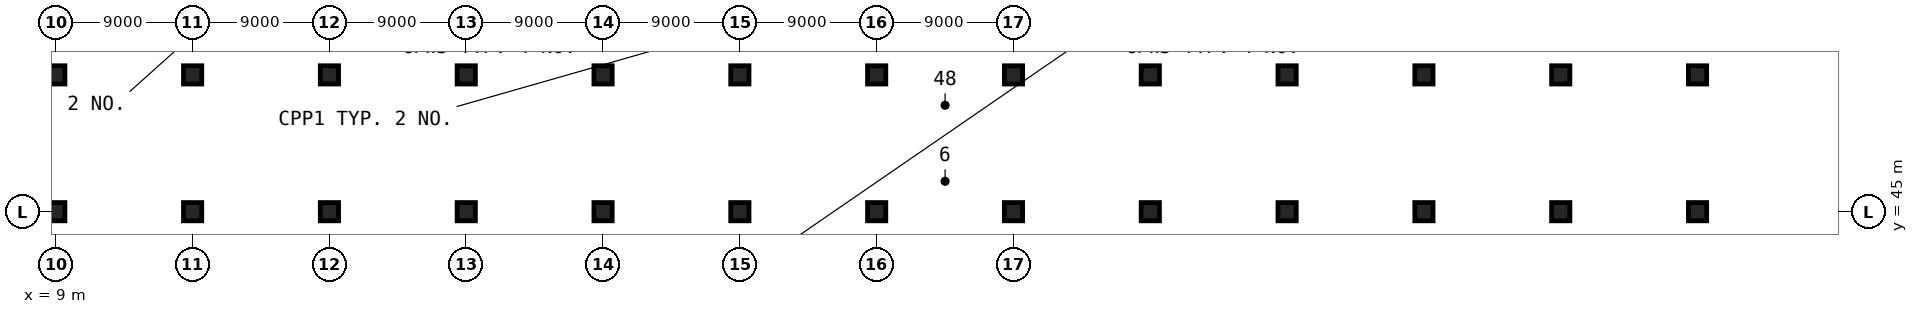
"""IFC4 building model, lengths in metres.
Left out: names, types, materials, properties, quantities, classifications, styles, units other than length and angle.
Written with IfcOpenShell. Run it as: python <this file> out.ifc"""

import sys

from ifc_helpers import new_model, si_unit, direction, frame, origin, origin_2d, place, context, subcontext, project, spatial, rectangle, extrude, element, save


model = new_model("IFC4")
c1 = context("Model", 3, precision=1e-05, world=origin(), true_north=direction((0.0, 1.0)))
c2 = subcontext(c1, "Body", "Model", "MODEL_VIEW")
j1 = project(units=[si_unit("LENGTHUNIT", "METRE"), si_unit("PLANEANGLEUNIT", "RADIAN")], contexts=[c1])
p1 = place(None, origin())
s1 = spatial("IfcSite", under=j1, at=p1, CompositionType="ELEMENT")
p2 = place(p1, origin())
s2 = spatial("IfcBuilding", under=s1, at=p2, CompositionType="ELEMENT")
p3 = place(p2, frame((0.0, 0.0, -9.0)))
s3 = spatial("IfcBuildingStorey", under=s2, at=p3, CompositionType="ELEMENT", Elevation=-9.0)
for number, where, z_axis, x_axis in (
    (1, (9.0, 45.0, 0.0), (0.0, 0.0, 1.0), (1.0, 0.0, 0.0)),
    (2, (9.0, 54.0, 0.0), (0.0, 0.0, 1.0), (1.0, 0.0, 0.0)),
    (3, (18.0, 45.0, 0.0), (0.0, 0.0, 1.0), (1.0, 0.0, 0.0)),
    (4, (18.0, 54.0, 0.0), (0.0, 0.0, 1.0), (1.0, 0.0, 0.0)),
    (5, (27.0, 45.0, 0.0), (0.0, 0.0, 1.0), (1.0, 0.0, 0.0)),
    (6, (27.0, 54.0, 0.0), (0.0, 0.0, 1.0), (1.0, 0.0, 0.0)),
    (7, (36.0, 45.0, 0.0), (0.0, 0.0, 1.0), (1.0, 0.0, 0.0)),
    (8, (36.0, 54.0, 0.0), (0.0, 0.0, 1.0), (1.0, 0.0, 0.0)),
    (9, (45.0, 45.0, 0.0), (0.0, 0.0, 1.0), (1.0, 0.0, 0.0)),
    (10, (45.0, 54.0, 0.0), (0.0, 0.0, 1.0), (1.0, 0.0, 0.0)),
    (11, (54.0, 45.0, 0.0), (0.0, 0.0, 1.0), (1.0, 0.0, 0.0)),
    (12, (54.0, 54.0, 0.0), (0.0, 0.0, 1.0), (1.0, 0.0, 0.0)),
    (13, (63.0, 45.0, 0.0), (0.0, 0.0, 1.0), (1.0, 0.0, 0.0)),
    (14, (63.0, 54.0, 0.0), (0.0, 0.0, 1.0), (1.0, 0.0, 0.0)),
    (15, (72.0, 45.0, 0.0), (0.0, 0.0, 1.0), (1.0, 0.0, 0.0)),
    (16, (72.0, 54.0, 0.0), (0.0, 0.0, 1.0), (1.0, 0.0, 0.0)),
    (17, (81.0, 45.0, 0.0), (0.0, 0.0, 1.0), (1.0, 0.0, 0.0)),
    (18, (81.0, 54.0, 0.0), (0.0, 0.0, 1.0), (1.0, 0.0, 0.0)),
    (19, (90.0, 45.0, 0.0), (0.0, 0.0, 1.0), (1.0, 0.0, 0.0)),
    (20, (90.0, 54.0, 0.0), (0.0, 0.0, 1.0), (1.0, 0.0, 0.0)),
    (21, (99.0, 45.0, 0.0), (0.0, 0.0, 1.0), (1.0, 0.0, 0.0)),
    (22, (99.0, 54.0, 0.0), (0.0, 0.0, 1.0), (1.0, 0.0, 0.0)),
    (23, (108.0, 45.0, 0.0), (0.0, 0.0, 1.0), (1.0, 0.0, 0.0)),
    (24, (108.0, 54.0, 0.0), (0.0, 0.0, 1.0), (1.0, 0.0, 0.0)),
    (25, (117.0, 45.0, 0.0), (0.0, 0.0, 1.0), (1.0, 0.0, 0.0)),
    (26, (117.0, 54.0, 0.0), (0.0, 0.0, 1.0), (1.0, 0.0, 0.0)),
):
    element("IfcColumn", number, at=place(p3, frame(where, z_axis=z_axis, x_axis=x_axis)), inside=s3, PredefinedType="COLUMN", context=c2, shape_type="SweptSolid", body=[
        extrude(rectangle(XDim=1.2, YDim=1.2, at=origin_2d()), origin(), (0.0, 0.0, 1.0), 4.5),
    ])
save(model, sys.argv[1])
